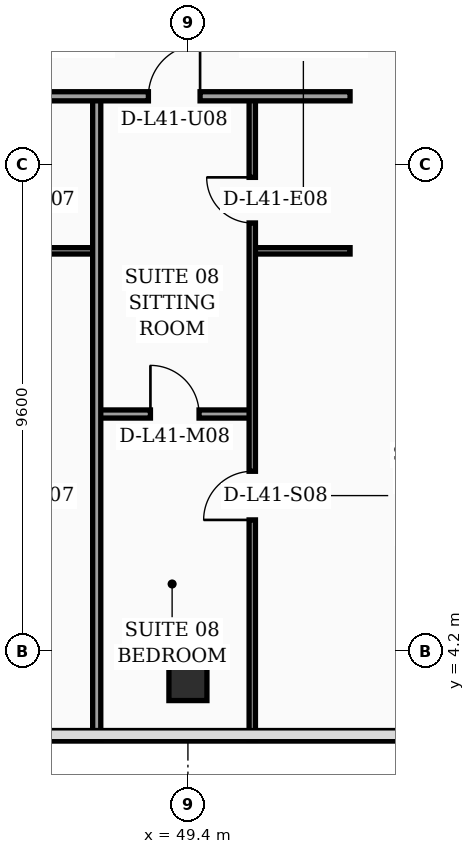
"""IFC4 building model, lengths in metres.
Left out: names, types, materials, properties, quantities, classifications, styles, units other than length and angle.
Written with IfcOpenShell. Run it as: python <this file> out.ifc"""

import sys

from ifc_helpers import new_model, si_unit, direction, frame, frame_2d, origin, origin_2d, place, context, subcontext, project, spatial, rectangle, hollow_rectangle, extrude, element, fill, save


model = new_model("IFC4")
c1 = context("Model", 3, precision=1e-05, world=origin(), true_north=direction((0.0, 1.0)))
c2 = subcontext(c1, "Body", "Model", "MODEL_VIEW")
j1 = project(units=[si_unit("LENGTHUNIT", "METRE"), si_unit("PLANEANGLEUNIT", "RADIAN")], contexts=[c1])
p1 = place(None, origin())
s1 = spatial("IfcSite", under=j1, at=p1, CompositionType="ELEMENT")
p2 = place(p1, origin())
s2 = spatial("IfcBuilding", under=s1, at=p2, CompositionType="ELEMENT")
p3 = place(p2, frame((0.0, 0.0, 167.5)))
s3 = spatial("IfcBuildingStorey", under=s2, at=p3, CompositionType="ELEMENT", Elevation=167.5)
p4 = place(p3, frame((49.4, 3.6, 0.0), z_axis=(0.0, 0.0, 1.0), x_axis=(1.0, 0.0, 0.0)))
e1 = element("IfcColumn", 1, at=p4, inside=s3, PredefinedType="COLUMN", context=c2, shape_type="SweptSolid", body=[
    extrude(hollow_rectangle(XDim=0.75, YDim=0.75, WallThickness=0.032, at=origin_2d()), origin(), (0.0, 0.0, 1.0), 3.56),
])
p5 = place(p3, frame((59.23, 5.505, 0.0), z_axis=(0.0, 0.0, 1.0), x_axis=(-0.300509063924, 0.953778958931, 0.0)))
e2 = element("IfcWall", 2, at=p5, inside=s3, PredefinedType="SOLIDWALL", context=c2, shape_type="SweptSolid", body=[
    extrude(rectangle(XDim=30.814, YDim=0.32, at=frame_2d((15.407, 0.0))), origin(), (0.0, 0.0, 1.0), 3.56),
])
p6 = place(p5, frame((4.747, 0.0, 0.0)))
e3 = element("IfcOpeningElement", 3, at=p6, cuts=e2, PredefinedType="OPENING", context=c2, shape_type="SweptSolid", body=[
    extrude(rectangle(XDim=1.4, YDim=2.25, at=frame_2d((0.7, 1.125))), frame((0.0, 0.17, 0.0), z_axis=(0.0, -1.0, 0.0), x_axis=(1.0, 0.0, 0.0)), (0.0, 0.0, 1.0), 0.34),
])
p7 = place(p5, frame((1.6, 0.0, 0.75)))
e4 = element("IfcOpeningElement", 4, at=p7, cuts=e2, PredefinedType="OPENING", context=c2, shape_type="SweptSolid", body=[
    extrude(rectangle(XDim=1.5, YDim=1.6, at=frame_2d((0.75, 0.8))), frame((0.0, 0.17, 0.0), z_axis=(0.0, -1.0, 0.0), x_axis=(1.0, 0.0, 0.0)), (0.0, 0.0, 1.0), 0.34),
])
p8 = place(p5, frame((7.8, 0.0, 0.75)))
e5 = element("IfcOpeningElement", 5, at=p8, cuts=e2, PredefinedType="OPENING", context=c2, shape_type="SweptSolid", body=[
    extrude(rectangle(XDim=1.5, YDim=1.6, at=frame_2d((0.75, 0.8))), frame((0.0, 0.17, 0.0), z_axis=(0.0, -1.0, 0.0), x_axis=(1.0, 0.0, 0.0)), (0.0, 0.0, 1.0), 0.34),
])
p9 = place(p5, frame((10.9, 0.0, 0.75)))
e6 = element("IfcOpeningElement", 6, at=p9, cuts=e2, PredefinedType="OPENING", context=c2, shape_type="SweptSolid", body=[
    extrude(rectangle(XDim=1.5, YDim=1.6, at=frame_2d((0.75, 0.8))), frame((0.0, 0.17, 0.0), z_axis=(0.0, -1.0, 0.0), x_axis=(1.0, 0.0, 0.0)), (0.0, 0.0, 1.0), 0.34),
])
p10 = place(p5, frame((14.0, 0.0, 0.75)))
e7 = element("IfcOpeningElement", 7, at=p10, cuts=e2, PredefinedType="OPENING", context=c2, shape_type="SweptSolid", body=[
    extrude(rectangle(XDim=1.5, YDim=1.6, at=frame_2d((0.75, 0.8))), frame((0.0, 0.17, 0.0), z_axis=(0.0, -1.0, 0.0), x_axis=(1.0, 0.0, 0.0)), (0.0, 0.0, 1.0), 0.34),
])
p11 = place(p5, frame((17.1, 0.0, 0.75)))
e8 = element("IfcOpeningElement", 8, at=p11, cuts=e2, PredefinedType="OPENING", context=c2, shape_type="SweptSolid", body=[
    extrude(rectangle(XDim=1.5, YDim=1.6, at=frame_2d((0.75, 0.8))), frame((0.0, 0.17, 0.0), z_axis=(0.0, -1.0, 0.0), x_axis=(1.0, 0.0, 0.0)), (0.0, 0.0, 1.0), 0.34),
])
p12 = place(p5, frame((20.2, 0.0, 0.75)))
e9 = element("IfcOpeningElement", 9, at=p12, cuts=e2, PredefinedType="OPENING", context=c2, shape_type="SweptSolid", body=[
    extrude(rectangle(XDim=1.5, YDim=1.6, at=frame_2d((0.75, 0.8))), frame((0.0, 0.17, 0.0), z_axis=(0.0, -1.0, 0.0), x_axis=(1.0, 0.0, 0.0)), (0.0, 0.0, 1.0), 0.34),
])
p13 = place(p5, frame((23.3, 0.0, 0.75)))
e10 = element("IfcOpeningElement", 10, at=p13, cuts=e2, PredefinedType="OPENING", context=c2, shape_type="SweptSolid", body=[
    extrude(rectangle(XDim=1.5, YDim=1.6, at=frame_2d((0.75, 0.8))), frame((0.0, 0.17, 0.0), z_axis=(0.0, -1.0, 0.0), x_axis=(1.0, 0.0, 0.0)), (0.0, 0.0, 1.0), 0.34),
])
p14 = place(p5, frame((26.4, 0.0, 0.75)))
e11 = element("IfcOpeningElement", 11, at=p14, cuts=e2, PredefinedType="OPENING", context=c2, shape_type="SweptSolid", body=[
    extrude(rectangle(XDim=1.5, YDim=1.6, at=frame_2d((0.75, 0.8))), frame((0.0, 0.17, 0.0), z_axis=(0.0, -1.0, 0.0), x_axis=(1.0, 0.0, 0.0)), (0.0, 0.0, 1.0), 0.34),
])
p15 = place(p3, frame((45.67, 12.1, 0.0), z_axis=(0.0, 0.0, 1.0), x_axis=(1.0, 0.0, 0.0)))
e12 = element("IfcWall", 12, at=p15, inside=s3, PredefinedType="PARTITIONING", context=c2, shape_type="SweptSolid", body=[
    extrude(rectangle(XDim=1.93, YDim=0.125, at=frame_2d((0.965, 0.0))), origin(), (0.0, 0.0, 1.0), 2.94),
])
p16 = place(p3, frame((50.67, 12.1, 0.0), z_axis=(0.0, 0.0, 1.0), x_axis=(1.0, 0.0, 0.0)))
e13 = element("IfcWall", 13, at=p16, inside=s3, PredefinedType="PARTITIONING", context=c2, shape_type="SweptSolid", body=[
    extrude(rectangle(XDim=1.93, YDim=0.125, at=frame_2d((0.965, 0.0))), origin(), (0.0, 0.0, 1.0), 3.56),
])
p17 = place(p3, frame((47.6, 8.88, 0.0), z_axis=(0.0, 0.0, 1.0), x_axis=(1.0, 0.0, 0.0)))
e14 = element("IfcWall", 14, at=p17, inside=s3, PredefinedType="PARTITIONING", context=c2, shape_type="SweptSolid", body=[
    extrude(rectangle(XDim=3.07, YDim=0.16, at=frame_2d((1.535, 0.0))), origin(), (0.0, 0.0, 1.0), 2.94),
])
p18 = place(p17, frame((1.06, 0.0, 0.0)))
e15 = element("IfcOpeningElement", 15, at=p18, cuts=e14, PredefinedType="OPENING", context=c2, shape_type="SweptSolid", body=[
    extrude(rectangle(XDim=0.96, YDim=2.2, at=frame_2d((0.48, 1.1))), frame((0.0, 0.09, 0.0), z_axis=(0.0, -1.0, 0.0), x_axis=(1.0, 0.0, 0.0)), (0.0, 0.0, 1.0), 0.18),
])
p19 = place(p3, frame((50.67, 2.44, 0.0), z_axis=(0.0, 0.0, 1.0), x_axis=(0.0, 1.0, 0.0)))
e16 = element("IfcWall", 16, at=p19, inside=s3, PredefinedType="PARTITIONING", context=c2, shape_type="SweptSolid", body=[
    extrude(rectangle(XDim=12.71, YDim=0.125, at=frame_2d((6.355, 0.0))), origin(), (0.0, 0.0, 1.0), 3.04),
])
p20 = place(p19, frame((4.35, 0.0, 0.0)))
e17 = element("IfcOpeningElement", 17, at=p20, cuts=e16, PredefinedType="OPENING", context=c2, shape_type="SweptSolid", body=[
    extrude(rectangle(XDim=0.96, YDim=2.2, at=frame_2d((0.48, 1.1))), frame((0.0, 0.073, 0.0), z_axis=(0.0, -1.0, 0.0), x_axis=(1.0, 0.0, 0.0)), (0.0, 0.0, 1.0), 0.145),
])
p21 = place(p19, frame((10.21, 0.0, 0.0)))
e18 = element("IfcOpeningElement", 18, at=p21, cuts=e16, PredefinedType="OPENING", context=c2, shape_type="SweptSolid", body=[
    extrude(rectangle(XDim=0.9, YDim=2.15, at=frame_2d((0.45, 1.075))), frame((0.0, 0.073, 0.0), z_axis=(0.0, -1.0, 0.0), x_axis=(1.0, 0.0, 0.0)), (0.0, 0.0, 1.0), 0.145),
])
p22 = place(p3, frame((47.6, 2.44, 0.0), z_axis=(0.0, 0.0, 1.0), x_axis=(0.0, 1.0, 0.0)))
e19 = element("IfcWall", 19, at=p22, inside=s3, PredefinedType="PARTITIONING", context=c2, shape_type="SweptSolid", body=[
    extrude(rectangle(XDim=12.71, YDim=0.16, at=frame_2d((6.355, 0.0))), origin(), (0.0, 0.0, 1.0), 2.94),
])
p23 = place(p3, frame((32.4, 15.15, 0.0), z_axis=(0.0, 0.0, 1.0), x_axis=(1.0, 0.0, 0.0)))
e20 = element("IfcWall", 20, at=p23, inside=s3, PredefinedType="PARTITIONING", context=c2, shape_type="SweptSolid", body=[
    extrude(rectangle(XDim=20.2, YDim=0.18, at=frame_2d((10.1, 0.0))), origin(), (0.0, 0.0, 1.0), 2.94),
])
p24 = place(p23, frame((0.95, 0.0, 0.0)))
e21 = element("IfcOpeningElement", 21, at=p24, cuts=e20, PredefinedType="OPENING", context=c2, shape_type="SweptSolid", body=[
    extrude(rectangle(XDim=1.02, YDim=2.2, at=frame_2d((0.51, 1.1))), frame((0.0, 0.1, 0.0), z_axis=(0.0, -1.0, 0.0), x_axis=(1.0, 0.0, 0.0)), (0.0, 0.0, 1.0), 0.2),
])
p25 = place(p23, frame((5.95, 0.0, 0.0)))
e22 = element("IfcOpeningElement", 22, at=p25, cuts=e20, PredefinedType="OPENING", context=c2, shape_type="SweptSolid", body=[
    extrude(rectangle(XDim=1.02, YDim=2.2, at=frame_2d((0.51, 1.1))), frame((0.0, 0.1, 0.0), z_axis=(0.0, -1.0, 0.0), x_axis=(1.0, 0.0, 0.0)), (0.0, 0.0, 1.0), 0.2),
])
p26 = place(p23, frame((11.22, 0.0, 0.0)))
e23 = element("IfcOpeningElement", 23, at=p26, cuts=e20, PredefinedType="OPENING", context=c2, shape_type="SweptSolid", body=[
    extrude(rectangle(XDim=1.02, YDim=2.2, at=frame_2d((0.51, 1.1))), frame((0.0, 0.1, 0.0), z_axis=(0.0, -1.0, 0.0), x_axis=(1.0, 0.0, 0.0)), (0.0, 0.0, 1.0), 0.2),
])
p27 = place(p23, frame((16.22, 0.0, 0.0)))
e24 = element("IfcOpeningElement", 24, at=p27, cuts=e20, PredefinedType="OPENING", context=c2, shape_type="SweptSolid", body=[
    extrude(rectangle(XDim=1.02, YDim=2.2, at=frame_2d((0.51, 1.1))), frame((0.0, 0.1, 0.0), z_axis=(0.0, -1.0, 0.0), x_axis=(1.0, 0.0, 0.0)), (0.0, 0.0, 1.0), 0.2),
])
p28 = place(p18, origin())
e25 = element("IfcDoor", 25, at=p28, inside=s3, OperationType="SINGLE_SWING_LEFT", PredefinedType="DOOR", context=c2, shape_type="SweptSolid", body=[
    extrude(rectangle(XDim=0.96, YDim=2.2, at=frame_2d((0.48, 1.1))), frame((0.0, 0.025, 0.0), z_axis=(0.0, -1.0, 0.0), x_axis=(1.0, 0.0, 0.0)), (0.0, 0.0, 1.0), 0.05),
])
fill(e15, e25)
p29 = place(p20, origin())
e26 = element("IfcDoor", 26, at=p29, inside=s3, OperationType="SINGLE_SWING_LEFT", PredefinedType="DOOR", context=c2, shape_type="SweptSolid", body=[
    extrude(rectangle(XDim=0.96, YDim=2.2, at=frame_2d((0.48, 1.1))), frame((0.0, 0.025, 0.0), z_axis=(0.0, -1.0, 0.0), x_axis=(1.0, 0.0, 0.0)), (0.0, 0.0, 1.0), 0.05),
])
fill(e17, e26)
p30 = place(p21, origin())
e27 = element("IfcDoor", 27, at=p30, inside=s3, OperationType="SINGLE_SWING_RIGHT", PredefinedType="DOOR", context=c2, shape_type="SweptSolid", body=[
    extrude(rectangle(XDim=0.9, YDim=2.15, at=frame_2d((0.45, 1.075))), frame((0.0, 0.025, 0.0), z_axis=(0.0, -1.0, 0.0), x_axis=(1.0, 0.0, 0.0)), (0.0, 0.0, 1.0), 0.05),
])
fill(e18, e27)
p31 = place(p27, origin())
e28 = element("IfcDoor", 28, at=p31, inside=s3, OperationType="SINGLE_SWING_RIGHT", PredefinedType="DOOR", context=c2, shape_type="SweptSolid", body=[
    extrude(rectangle(XDim=1.02, YDim=2.2, at=frame_2d((0.51, 1.1))), frame((0.0, 0.025, 0.0), z_axis=(0.0, -1.0, 0.0), x_axis=(1.0, 0.0, 0.0)), (0.0, 0.0, 1.0), 0.05),
])
fill(e24, e28)
save(model, sys.argv[1])
